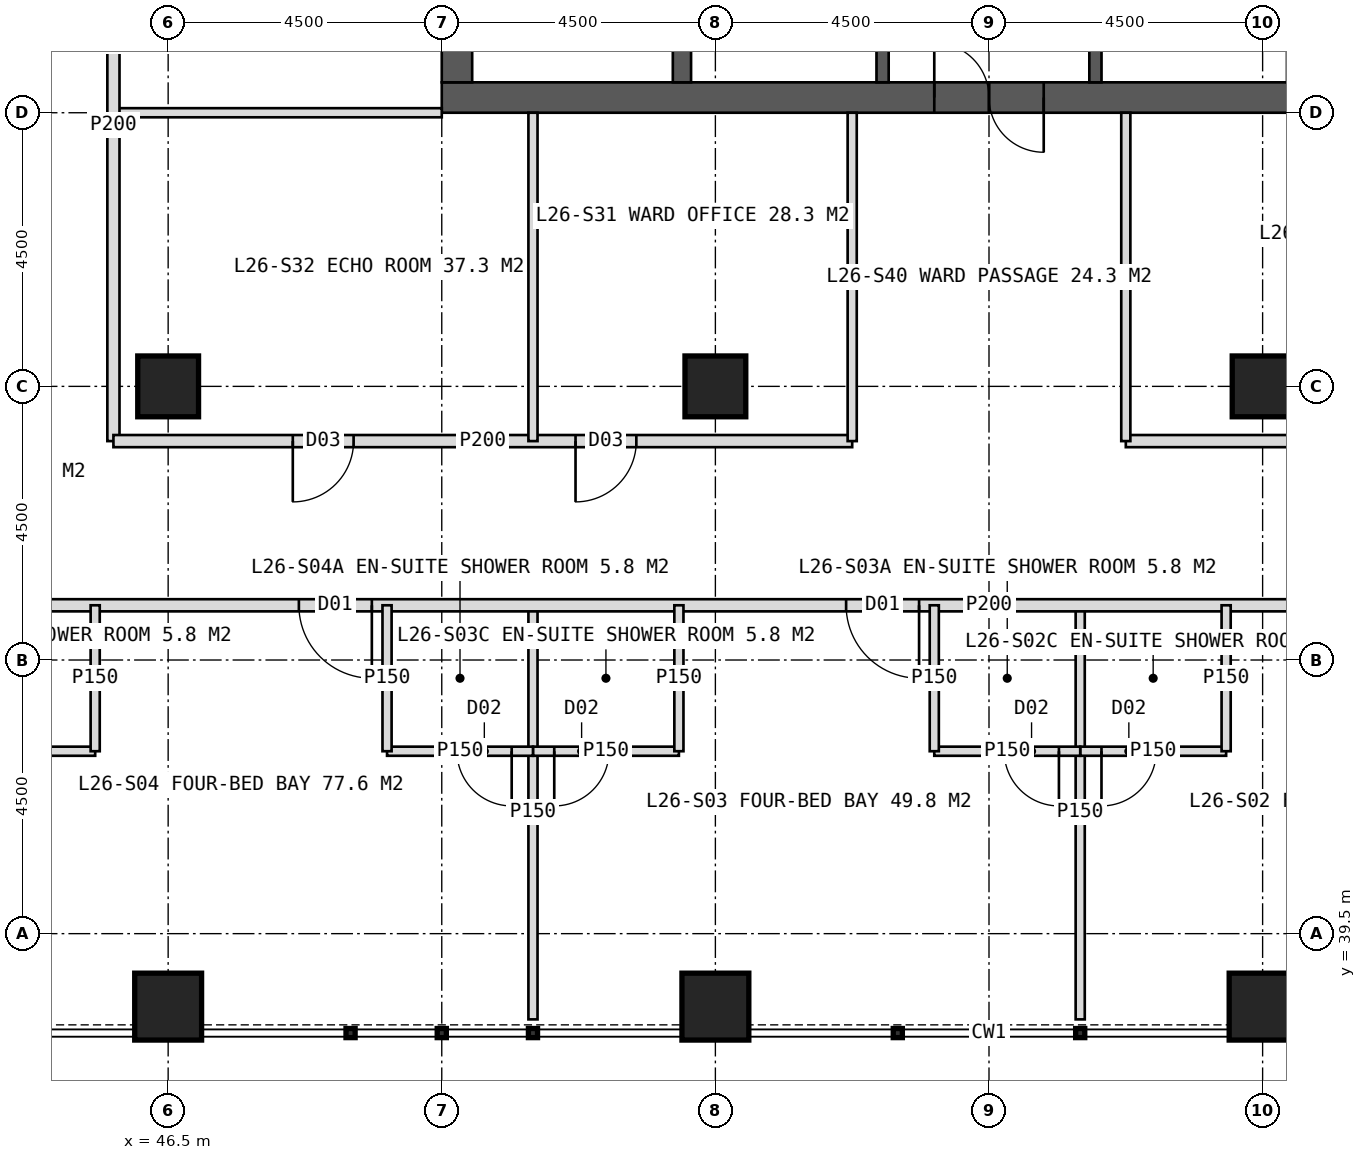
"""IFC4 building model, lengths in metres.
Left out: names, types, materials, properties, quantities, classifications, styles, units other than length and angle.
Written with IfcOpenShell. Run it as: python <this file> out.ifc"""

import sys

from ifc_helpers import new_model, si_unit, direction, frame, frame_2d, origin, origin_2d, place, context, subcontext, project, spatial, rectangle, hollow_rectangle, extrude, element, fill, save


model = new_model("IFC4")
c1 = context("Model", 3, precision=1e-05, world=origin(), true_north=direction((0.0, 1.0)))
c2 = subcontext(c1, "Body", "Model", "MODEL_VIEW")
j1 = project(units=[si_unit("LENGTHUNIT", "METRE"), si_unit("PLANEANGLEUNIT", "RADIAN")], contexts=[c1])
p1 = place(None, origin())
s1 = spatial("IfcSite", under=j1, at=p1, CompositionType="ELEMENT")
p2 = place(p1, origin())
s2 = spatial("IfcBuilding", under=s1, at=p2, CompositionType="ELEMENT")
p3 = place(p2, frame((0.0, 0.0, 112.0)))
s3 = spatial("IfcBuildingStorey", under=s2, at=p3, CompositionType="ELEMENT", Elevation=112.0)
p4 = place(p3, frame((51.0, 53.25, 0.0), z_axis=(0.0, 0.0, 1.0), x_axis=(1.0, 0.0, 0.0)))
e1 = element("IfcWall", 1, at=p4, inside=s3, PredefinedType="SHEAR", context=c2, shape_type="SweptSolid", body=[
    extrude(rectangle(XDim=18.0, YDim=0.5, at=frame_2d((9.0, 0.0))), origin(), (0.0, 0.0, 1.0), 4.0),
])
p5 = place(p4, frame((8.1, 0.0, 0.0)))
e2 = element("IfcOpeningElement", 2, at=p5, cuts=e1, PredefinedType="OPENING", context=c2, shape_type="SweptSolid", body=[
    extrude(rectangle(XDim=1.8, YDim=2.2, at=frame_2d((0.9, 1.1))), frame((0.0, 0.26, 0.0), z_axis=(0.0, -1.0, 0.0), x_axis=(1.0, 0.0, 0.0)), (0.0, 0.0, 1.0), 0.52),
])
p6 = place(p3, frame((51.25, 53.5, 0.0), z_axis=(0.0, 0.0, 1.0), x_axis=(0.0, 1.0, 0.0)))
e3 = element("IfcWall", 3, at=p6, inside=s3, PredefinedType="SHEAR", context=c2, shape_type="SweptSolid", body=[
    extrude(rectangle(XDim=17.0, YDim=0.5, at=frame_2d((8.5, 0.0))), origin(), (0.0, 0.0, 1.0), 4.0),
])
p7 = place(p6, frame((6.0, 0.0, 0.0)))
e4 = element("IfcOpeningElement", 4, at=p7, cuts=e3, PredefinedType="OPENING", context=c2, shape_type="SweptSolid", body=[
    extrude(rectangle(XDim=1.5, YDim=2.2, at=frame_2d((0.75, 1.1))), frame((0.0, 0.26, 0.0), z_axis=(0.0, -1.0, 0.0), x_axis=(1.0, 0.0, 0.0)), (0.0, 0.0, 1.0), 0.52),
])
p8 = place(p3, frame((54.95, 53.5, 0.0), z_axis=(0.0, 0.0, 1.0), x_axis=(0.0, 1.0, 0.0)))
e5 = element("IfcWall", 5, at=p8, inside=s3, PredefinedType="SHEAR", context=c2, shape_type="SweptSolid", body=[
    extrude(rectangle(XDim=17.0, YDim=0.3, at=frame_2d((8.5, 0.0))), origin(), (0.0, 0.0, 1.0), 4.0),
])
p9 = place(p3, frame((58.25, 53.5, 0.0), z_axis=(0.0, 0.0, 1.0), x_axis=(0.0, 1.0, 0.0)))
e6 = element("IfcWall", 6, at=p9, inside=s3, PredefinedType="SHEAR", context=c2, shape_type="SweptSolid", body=[
    extrude(rectangle(XDim=17.0, YDim=0.2, at=frame_2d((8.5, 0.0))), origin(), (0.0, 0.0, 1.0), 4.0),
])
p10 = place(p9, frame((1.375, 0.0, 0.0)))
e7 = element("IfcOpeningElement", 7, at=p10, cuts=e6, PredefinedType="OPENING", context=c2, shape_type="SweptSolid", body=[
    extrude(rectangle(XDim=1.4, YDim=2.2, at=frame_2d((0.7, 1.1))), frame((0.0, 0.11, 0.0), z_axis=(0.0, -1.0, 0.0), x_axis=(1.0, 0.0, 0.0)), (0.0, 0.0, 1.0), 0.22),
])
p11 = place(p9, frame((5.675, 0.0, 0.0)))
e8 = element("IfcOpeningElement", 8, at=p11, cuts=e6, PredefinedType="OPENING", context=c2, shape_type="SweptSolid", body=[
    extrude(rectangle(XDim=1.4, YDim=2.2, at=frame_2d((0.7, 1.1))), frame((0.0, 0.11, 0.0), z_axis=(0.0, -1.0, 0.0), x_axis=(1.0, 0.0, 0.0)), (0.0, 0.0, 1.0), 0.22),
])
p12 = place(p3, frame((61.75, 53.5, 0.0), z_axis=(0.0, 0.0, 1.0), x_axis=(0.0, 1.0, 0.0)))
e9 = element("IfcWall", 9, at=p12, inside=s3, PredefinedType="SHEAR", context=c2, shape_type="SweptSolid", body=[
    extrude(rectangle(XDim=17.0, YDim=0.2, at=frame_2d((8.5, 0.0))), origin(), (0.0, 0.0, 1.0), 4.0),
])
p13 = place(p12, frame((1.375, 0.0, 0.0)))
e10 = element("IfcOpeningElement", 10, at=p13, cuts=e9, PredefinedType="OPENING", context=c2, shape_type="SweptSolid", body=[
    extrude(rectangle(XDim=1.4, YDim=2.2, at=frame_2d((0.7, 1.1))), frame((0.0, 0.11, 0.0), z_axis=(0.0, -1.0, 0.0), x_axis=(1.0, 0.0, 0.0)), (0.0, 0.0, 1.0), 0.22),
])
p14 = place(p12, frame((5.675, 0.0, 0.0)))
e11 = element("IfcOpeningElement", 11, at=p14, cuts=e9, PredefinedType="OPENING", context=c2, shape_type="SweptSolid", body=[
    extrude(rectangle(XDim=1.4, YDim=2.2, at=frame_2d((0.7, 1.1))), frame((0.0, 0.11, 0.0), z_axis=(0.0, -1.0, 0.0), x_axis=(1.0, 0.0, 0.0)), (0.0, 0.0, 1.0), 0.22),
])
for number, where, z_axis, x_axis in (
    (12, (46.5, 48.5, 0.0), (0.0, 0.0, 1.0), (1.0, 0.0, 0.0)),
    (13, (55.5, 48.5, 0.0), (0.0, 0.0, 1.0), (1.0, 0.0, 0.0)),
    (14, (64.5, 48.5, 0.0), (0.0, 0.0, 1.0), (1.0, 0.0, 0.0)),
):
    element("IfcColumn", number, at=place(p3, frame(where, z_axis=z_axis, x_axis=x_axis)), inside=s3, PredefinedType="COLUMN", context=c2, shape_type="SweptSolid", body=[
        extrude(hollow_rectangle(XDim=1.0, YDim=1.0, WallThickness=0.1, at=origin_2d()), origin(), (0.0, 0.0, 1.0), 4.0),
    ])
for number, where, z_axis, x_axis in (
    (15, (46.5, 38.3, 0.0), (0.0, 0.0, 1.0), (1.0, 0.0, 0.0)),
    (16, (55.5, 38.3, 0.0), (0.0, 0.0, 1.0), (1.0, 0.0, 0.0)),
    (17, (64.5, 38.3, 0.0), (0.0, 0.0, 1.0), (1.0, 0.0, 0.0)),
):
    element("IfcColumn", number, at=place(p3, frame(where, z_axis=z_axis, x_axis=x_axis)), inside=s3, PredefinedType="COLUMN", context=c2, shape_type="SweptSolid", body=[
        extrude(hollow_rectangle(XDim=1.1, YDim=1.1, WallThickness=0.1, at=origin_2d()), origin(), (0.0, 0.0, 1.0), 4.0),
    ])
p15 = place(p3, frame((51.0, 53.0, 0.0), z_axis=(0.0, 0.0, 1.0), x_axis=(-1.0, 0.0, 0.0)))
e18 = element("IfcWall", 18, at=p15, inside=s3, PredefinedType="PARTITIONING", context=c2, shape_type="SweptSolid", body=[
    extrude(rectangle(XDim=5.4, YDim=0.15, at=frame_2d((2.7, 0.0))), origin(), (0.0, 0.0, 1.0), 3.75),
])
p16 = place(p3, frame((45.6, 47.6, 0.0), z_axis=(0.0, 0.0, 1.0), x_axis=(0.0, 1.0, 0.0)))
e19 = element("IfcWall", 19, at=p16, inside=s3, PredefinedType="PARTITIONING", context=c2, shape_type="SweptSolid", body=[
    extrude(rectangle(XDim=10.4, YDim=0.2, at=frame_2d((5.2, 0.0))), origin(), (0.0, 0.0, 1.0), 3.75),
])
p17 = place(p16, frame((7.4, 0.0, 0.0)))
e20 = element("IfcOpeningElement", 20, at=p17, cuts=e19, PredefinedType="OPENING", context=c2, shape_type="SweptSolid", body=[
    extrude(rectangle(XDim=1.0, YDim=2.1, at=frame_2d((0.5, 1.05))), frame((0.0, 0.11, 0.0), z_axis=(0.0, -1.0, 0.0), x_axis=(1.0, 0.0, 0.0)), (0.0, 0.0, 1.0), 0.22),
])
for number, where, z_axis, x_axis in (
    (21, (61.5, 44.9, 0.0), (0.0, 0.0, 1.0), (0.0, -1.0, 0.0)),
    (22, (52.5, 44.9, 0.0), (0.0, 0.0, 1.0), (0.0, -1.0, 0.0)),
):
    element("IfcWall", number, at=place(p3, frame(where, z_axis=z_axis, x_axis=x_axis)), inside=s3, PredefinedType="PARTITIONING", context=c2, shape_type="SweptSolid", body=[
        extrude(rectangle(XDim=6.81, YDim=0.15, at=frame_2d((3.405, 0.0))), origin(), (0.0, 0.0, 1.0), 3.75),
    ])
p18 = place(p3, frame((77.1, 44.9, 0.0), z_axis=(0.0, 0.0, 1.0), x_axis=(-1.0, 0.0, 0.0)))
e23 = element("IfcWall", 23, at=p18, inside=s3, PredefinedType="PARTITIONING", context=c2, shape_type="SweptSolid", body=[
    extrude(rectangle(XDim=34.2, YDim=0.2, at=frame_2d((17.1, 0.0))), origin(), (0.0, 0.0, 1.0), 3.75),
])
p19 = place(p18, frame((3.25, 0.0, 0.0)))
e24 = element("IfcOpeningElement", 24, at=p19, cuts=e23, PredefinedType="OPENING", context=c2, shape_type="SweptSolid", body=[
    extrude(rectangle(XDim=1.2, YDim=2.2, at=frame_2d((0.6, 1.1))), frame((0.0, 0.11, 0.0), z_axis=(0.0, -1.0, 0.0), x_axis=(1.0, 0.0, 0.0)), (0.0, 0.0, 1.0), 0.22),
])
p20 = place(p18, frame((9.25, 0.0, 0.0)))
e25 = element("IfcOpeningElement", 25, at=p20, cuts=e23, PredefinedType="OPENING", context=c2, shape_type="SweptSolid", body=[
    extrude(rectangle(XDim=1.2, YDim=2.2, at=frame_2d((0.6, 1.1))), frame((0.0, 0.11, 0.0), z_axis=(0.0, -1.0, 0.0), x_axis=(1.0, 0.0, 0.0)), (0.0, 0.0, 1.0), 0.22),
])
p21 = place(p18, frame((18.25, 0.0, 0.0)))
e26 = element("IfcOpeningElement", 26, at=p21, cuts=e23, PredefinedType="OPENING", context=c2, shape_type="SweptSolid", body=[
    extrude(rectangle(XDim=1.2, YDim=2.2, at=frame_2d((0.6, 1.1))), frame((0.0, 0.11, 0.0), z_axis=(0.0, -1.0, 0.0), x_axis=(1.0, 0.0, 0.0)), (0.0, 0.0, 1.0), 0.22),
])
p22 = place(p18, frame((27.25, 0.0, 0.0)))
e27 = element("IfcOpeningElement", 27, at=p22, cuts=e23, PredefinedType="OPENING", context=c2, shape_type="SweptSolid", body=[
    extrude(rectangle(XDim=1.2, YDim=2.2, at=frame_2d((0.6, 1.1))), frame((0.0, 0.11, 0.0), z_axis=(0.0, -1.0, 0.0), x_axis=(1.0, 0.0, 0.0)), (0.0, 0.0, 1.0), 0.22),
])
p23 = place(p3, frame((63.9, 42.5, 0.0), z_axis=(0.0, 0.0, 1.0), x_axis=(-1.0, 0.0, 0.0)))
e28 = element("IfcWall", 28, at=p23, inside=s3, PredefinedType="PARTITIONING", context=c2, shape_type="SweptSolid", body=[
    extrude(rectangle(XDim=2.4, YDim=0.15, at=frame_2d((1.2, 0.0))), origin(), (0.0, 0.0, 1.0), 3.75),
])
p24 = place(p23, frame((1.15, 0.0, 0.0)))
e29 = element("IfcOpeningElement", 29, at=p24, cuts=e28, PredefinedType="OPENING", context=c2, shape_type="SweptSolid", body=[
    extrude(rectangle(XDim=0.9, YDim=2.1, at=frame_2d((0.45, 1.05))), frame((0.0, 0.085, 0.0), z_axis=(0.0, -1.0, 0.0), x_axis=(1.0, 0.0, 0.0)), (0.0, 0.0, 1.0), 0.17),
])
p25 = place(p3, frame((63.9, 44.9, 0.0), z_axis=(0.0, 0.0, 1.0), x_axis=(0.0, -1.0, 0.0)))
e30 = element("IfcWall", 30, at=p25, inside=s3, PredefinedType="PARTITIONING", context=c2, shape_type="SweptSolid", body=[
    extrude(rectangle(XDim=2.4, YDim=0.15, at=frame_2d((1.2, 0.0))), origin(), (0.0, 0.0, 1.0), 3.75),
])
p26 = place(p3, frame((61.5, 42.5, 0.0), z_axis=(0.0, 0.0, 1.0), x_axis=(-1.0, 0.0, 0.0)))
e31 = element("IfcWall", 31, at=p26, inside=s3, PredefinedType="PARTITIONING", context=c2, shape_type="SweptSolid", body=[
    extrude(rectangle(XDim=2.4, YDim=0.15, at=frame_2d((1.2, 0.0))), origin(), (0.0, 0.0, 1.0), 3.75),
])
p27 = place(p26, frame((0.35, 0.0, 0.0)))
e32 = element("IfcOpeningElement", 32, at=p27, cuts=e31, PredefinedType="OPENING", context=c2, shape_type="SweptSolid", body=[
    extrude(rectangle(XDim=0.9, YDim=2.1, at=frame_2d((0.45, 1.05))), frame((0.0, 0.085, 0.0), z_axis=(0.0, -1.0, 0.0), x_axis=(1.0, 0.0, 0.0)), (0.0, 0.0, 1.0), 0.17),
])
p28 = place(p3, frame((59.1, 44.9, 0.0), z_axis=(0.0, 0.0, 1.0), x_axis=(0.0, -1.0, 0.0)))
e33 = element("IfcWall", 33, at=p28, inside=s3, PredefinedType="PARTITIONING", context=c2, shape_type="SweptSolid", body=[
    extrude(rectangle(XDim=2.4, YDim=0.15, at=frame_2d((1.2, 0.0))), origin(), (0.0, 0.0, 1.0), 3.75),
])
p29 = place(p3, frame((54.9, 42.5, 0.0), z_axis=(0.0, 0.0, 1.0), x_axis=(-1.0, 0.0, 0.0)))
e34 = element("IfcWall", 34, at=p29, inside=s3, PredefinedType="PARTITIONING", context=c2, shape_type="SweptSolid", body=[
    extrude(rectangle(XDim=2.4, YDim=0.15, at=frame_2d((1.2, 0.0))), origin(), (0.0, 0.0, 1.0), 3.75),
])
p30 = place(p29, frame((1.15, 0.0, 0.0)))
e35 = element("IfcOpeningElement", 35, at=p30, cuts=e34, PredefinedType="OPENING", context=c2, shape_type="SweptSolid", body=[
    extrude(rectangle(XDim=0.9, YDim=2.1, at=frame_2d((0.45, 1.05))), frame((0.0, 0.085, 0.0), z_axis=(0.0, -1.0, 0.0), x_axis=(1.0, 0.0, 0.0)), (0.0, 0.0, 1.0), 0.17),
])
p31 = place(p3, frame((54.9, 44.9, 0.0), z_axis=(0.0, 0.0, 1.0), x_axis=(0.0, -1.0, 0.0)))
e36 = element("IfcWall", 36, at=p31, inside=s3, PredefinedType="PARTITIONING", context=c2, shape_type="SweptSolid", body=[
    extrude(rectangle(XDim=2.4, YDim=0.15, at=frame_2d((1.2, 0.0))), origin(), (0.0, 0.0, 1.0), 3.75),
])
p32 = place(p3, frame((52.5, 42.5, 0.0), z_axis=(0.0, 0.0, 1.0), x_axis=(-1.0, 0.0, 0.0)))
e37 = element("IfcWall", 37, at=p32, inside=s3, PredefinedType="PARTITIONING", context=c2, shape_type="SweptSolid", body=[
    extrude(rectangle(XDim=2.4, YDim=0.15, at=frame_2d((1.2, 0.0))), origin(), (0.0, 0.0, 1.0), 3.75),
])
p33 = place(p32, frame((0.35, 0.0, 0.0)))
e38 = element("IfcOpeningElement", 38, at=p33, cuts=e37, PredefinedType="OPENING", context=c2, shape_type="SweptSolid", body=[
    extrude(rectangle(XDim=0.9, YDim=2.1, at=frame_2d((0.45, 1.05))), frame((0.0, 0.085, 0.0), z_axis=(0.0, -1.0, 0.0), x_axis=(1.0, 0.0, 0.0)), (0.0, 0.0, 1.0), 0.17),
])
p34 = place(p3, frame((50.1, 44.9, 0.0), z_axis=(0.0, 0.0, 1.0), x_axis=(0.0, -1.0, 0.0)))
e39 = element("IfcWall", 39, at=p34, inside=s3, PredefinedType="PARTITIONING", context=c2, shape_type="SweptSolid", body=[
    extrude(rectangle(XDim=2.4, YDim=0.15, at=frame_2d((1.2, 0.0))), origin(), (0.0, 0.0, 1.0), 3.75),
])
p35 = place(p3, frame((45.3, 42.5, 0.0), z_axis=(0.0, 0.0, 1.0), x_axis=(-1.0, 0.0, 0.0)))
e40 = element("IfcWall", 40, at=p35, inside=s3, PredefinedType="PARTITIONING", context=c2, shape_type="SweptSolid", body=[
    extrude(rectangle(XDim=2.4, YDim=0.15, at=frame_2d((1.2, 0.0))), origin(), (0.0, 0.0, 1.0), 3.75),
])
p36 = place(p35, frame((1.15, 0.0, 0.0)))
e41 = element("IfcOpeningElement", 41, at=p36, cuts=e40, PredefinedType="OPENING", context=c2, shape_type="SweptSolid", body=[
    extrude(rectangle(XDim=0.9, YDim=2.1, at=frame_2d((0.45, 1.05))), frame((0.0, 0.085, 0.0), z_axis=(0.0, -1.0, 0.0), x_axis=(1.0, 0.0, 0.0)), (0.0, 0.0, 1.0), 0.17),
])
p37 = place(p3, frame((45.3, 44.9, 0.0), z_axis=(0.0, 0.0, 1.0), x_axis=(0.0, -1.0, 0.0)))
e42 = element("IfcWall", 42, at=p37, inside=s3, PredefinedType="PARTITIONING", context=c2, shape_type="SweptSolid", body=[
    extrude(rectangle(XDim=2.4, YDim=0.15, at=frame_2d((1.2, 0.0))), origin(), (0.0, 0.0, 1.0), 3.75),
])
p38 = place(p3, frame((74.4, 47.6, 0.0), z_axis=(0.0, 0.0, 1.0), x_axis=(-1.0, 0.0, 0.0)))
e43 = element("IfcWall", 43, at=p38, inside=s3, PredefinedType="PARTITIONING", context=c2, shape_type="SweptSolid", body=[
    extrude(rectangle(XDim=12.15, YDim=0.2, at=frame_2d((6.075, 0.0))), origin(), (0.0, 0.0, 1.0), 3.75),
])
p39 = place(p38, frame((6.85, 0.0, 0.0)))
e44 = element("IfcOpeningElement", 44, at=p39, cuts=e43, PredefinedType="OPENING", context=c2, shape_type="SweptSolid", body=[
    extrude(rectangle(XDim=1.0, YDim=2.1, at=frame_2d((0.5, 1.05))), frame((0.0, 0.11, 0.0), z_axis=(0.0, -1.0, 0.0), x_axis=(1.0, 0.0, 0.0)), (0.0, 0.0, 1.0), 0.22),
])
p40 = place(p3, frame((57.75, 47.6, 0.0), z_axis=(0.0, 0.0, 1.0), x_axis=(-1.0, 0.0, 0.0)))
e45 = element("IfcWall", 45, at=p40, inside=s3, PredefinedType="PARTITIONING", context=c2, shape_type="SweptSolid", body=[
    extrude(rectangle(XDim=12.15, YDim=0.2, at=frame_2d((6.075, 0.0))), origin(), (0.0, 0.0, 1.0), 3.75),
])
p41 = place(p40, frame((3.55, 0.0, 0.0)))
e46 = element("IfcOpeningElement", 46, at=p41, cuts=e45, PredefinedType="OPENING", context=c2, shape_type="SweptSolid", body=[
    extrude(rectangle(XDim=1.0, YDim=2.1, at=frame_2d((0.5, 1.05))), frame((0.0, 0.11, 0.0), z_axis=(0.0, -1.0, 0.0), x_axis=(1.0, 0.0, 0.0)), (0.0, 0.0, 1.0), 0.22),
])
p42 = place(p40, frame((8.2, 0.0, 0.0)))
e47 = element("IfcOpeningElement", 47, at=p42, cuts=e45, PredefinedType="OPENING", context=c2, shape_type="SweptSolid", body=[
    extrude(rectangle(XDim=1.0, YDim=2.1, at=frame_2d((0.5, 1.05))), frame((0.0, 0.11, 0.0), z_axis=(0.0, -1.0, 0.0), x_axis=(1.0, 0.0, 0.0)), (0.0, 0.0, 1.0), 0.22),
])
for number, where, z_axis, x_axis in (
    (48, (62.25, 53.0, 0.0), (0.0, 0.0, 1.0), (0.0, -1.0, 0.0)),
    (49, (57.75, 53.0, 0.0), (0.0, 0.0, 1.0), (0.0, -1.0, 0.0)),
    (50, (52.5, 53.0, 0.0), (0.0, 0.0, 1.0), (0.0, -1.0, 0.0)),
):
    element("IfcWall", number, at=place(p3, frame(where, z_axis=z_axis, x_axis=x_axis)), inside=s3, PredefinedType="PARTITIONING", context=c2, shape_type="SweptSolid", body=[
        extrude(rectangle(XDim=5.4, YDim=0.15, at=frame_2d((2.7, 0.0))), origin(), (0.0, 0.0, 1.0), 3.75),
    ])
p43 = place(p24, origin())
e51 = element("IfcDoor", 51, at=p43, inside=s3, OperationType="SINGLE_SWING_RIGHT", PredefinedType="DOOR", context=c2, shape_type="SweptSolid", body=[
    extrude(rectangle(XDim=0.9, YDim=2.1, at=frame_2d((0.45, 1.05))), frame((0.0, 0.025, 0.0), z_axis=(0.0, -1.0, 0.0), x_axis=(1.0, 0.0, 0.0)), (0.0, 0.0, 1.0), 0.05),
])
fill(e29, e51)
p44 = place(p21, origin())
e52 = element("IfcDoor", 52, at=p44, inside=s3, OperationType="SINGLE_SWING_LEFT", PredefinedType="DOOR", context=c2, shape_type="SweptSolid", body=[
    extrude(rectangle(XDim=1.2, YDim=2.2, at=frame_2d((0.6, 1.1))), frame((0.0, 0.025, 0.0), z_axis=(0.0, -1.0, 0.0), x_axis=(1.0, 0.0, 0.0)), (0.0, 0.0, 1.0), 0.05),
])
fill(e26, e52)
p45 = place(p27, origin())
e53 = element("IfcDoor", 53, at=p45, inside=s3, OperationType="SINGLE_SWING_LEFT", PredefinedType="DOOR", context=c2, shape_type="SweptSolid", body=[
    extrude(rectangle(XDim=0.9, YDim=2.1, at=frame_2d((0.45, 1.05))), frame((0.0, 0.025, 0.0), z_axis=(0.0, -1.0, 0.0), x_axis=(1.0, 0.0, 0.0)), (0.0, 0.0, 1.0), 0.05),
])
fill(e32, e53)
p46 = place(p30, origin())
e54 = element("IfcDoor", 54, at=p46, inside=s3, OperationType="SINGLE_SWING_RIGHT", PredefinedType="DOOR", context=c2, shape_type="SweptSolid", body=[
    extrude(rectangle(XDim=0.9, YDim=2.1, at=frame_2d((0.45, 1.05))), frame((0.0, 0.025, 0.0), z_axis=(0.0, -1.0, 0.0), x_axis=(1.0, 0.0, 0.0)), (0.0, 0.0, 1.0), 0.05),
])
fill(e35, e54)
p47 = place(p22, origin())
e55 = element("IfcDoor", 55, at=p47, inside=s3, OperationType="SINGLE_SWING_LEFT", PredefinedType="DOOR", context=c2, shape_type="SweptSolid", body=[
    extrude(rectangle(XDim=1.2, YDim=2.2, at=frame_2d((0.6, 1.1))), frame((0.0, 0.025, 0.0), z_axis=(0.0, -1.0, 0.0), x_axis=(1.0, 0.0, 0.0)), (0.0, 0.0, 1.0), 0.05),
])
fill(e27, e55)
p48 = place(p33, origin())
e56 = element("IfcDoor", 56, at=p48, inside=s3, OperationType="SINGLE_SWING_LEFT", PredefinedType="DOOR", context=c2, shape_type="SweptSolid", body=[
    extrude(rectangle(XDim=0.9, YDim=2.1, at=frame_2d((0.45, 1.05))), frame((0.0, 0.025, 0.0), z_axis=(0.0, -1.0, 0.0), x_axis=(1.0, 0.0, 0.0)), (0.0, 0.0, 1.0), 0.05),
])
fill(e38, e56)
p49 = place(p41, origin())
e57 = element("IfcDoor", 57, at=p49, inside=s3, OperationType="SINGLE_SWING_RIGHT", PredefinedType="DOOR", context=c2, shape_type="SweptSolid", body=[
    extrude(rectangle(XDim=1.0, YDim=2.1, at=frame_2d((0.5, 1.05))), frame((0.0, 0.025, 0.0), z_axis=(0.0, -1.0, 0.0), x_axis=(1.0, 0.0, 0.0)), (0.0, 0.0, 1.0), 0.05),
])
fill(e46, e57)
p50 = place(p42, origin())
e58 = element("IfcDoor", 58, at=p50, inside=s3, OperationType="SINGLE_SWING_RIGHT", PredefinedType="DOOR", context=c2, shape_type="SweptSolid", body=[
    extrude(rectangle(XDim=1.0, YDim=2.1, at=frame_2d((0.5, 1.05))), frame((0.0, 0.025, 0.0), z_axis=(0.0, -1.0, 0.0), x_axis=(1.0, 0.0, 0.0)), (0.0, 0.0, 1.0), 0.05),
])
fill(e47, e58)
p51 = place(p5, origin())
e59 = element("IfcDoor", 59, at=p51, inside=s3, OperationType="DOUBLE_DOOR_SINGLE_SWING", PredefinedType="DOOR", context=c2, shape_type="SweptSolid", body=[
    extrude(rectangle(XDim=1.8, YDim=2.2, at=frame_2d((0.9, 1.1))), frame((0.0, 0.025, 0.0), z_axis=(0.0, -1.0, 0.0), x_axis=(1.0, 0.0, 0.0)), (0.0, 0.0, 1.0), 0.05),
])
fill(e2, e59)
save(model, sys.argv[1])
